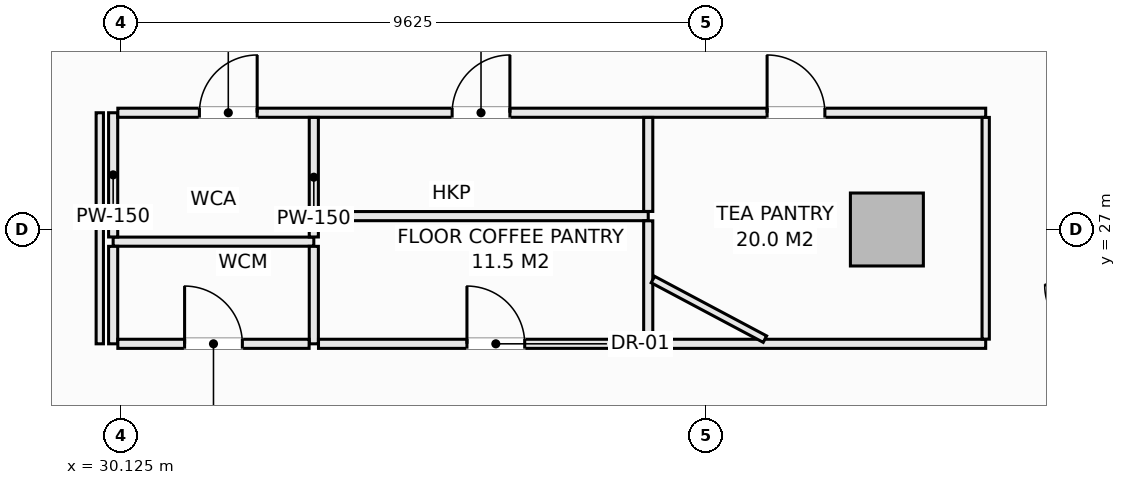
"""IFC4 building model, lengths in metres.
Left out: names, types, materials, properties, quantities, classifications, styles, units other than length and angle.
Written with IfcOpenShell. Run it as: python <this file> out.ifc"""

import sys

from ifc_helpers import new_model, si_unit, direction, frame, frame_2d, origin, origin_2d, place, context, subcontext, project, spatial, rectangle, extrude, element, fill, save


model = new_model("IFC4")
c1 = context("Model", 3, precision=1e-05, world=origin(), true_north=direction((0.0, 1.0)))
c2 = subcontext(c1, "Body", "Model", "MODEL_VIEW")
j1 = project(units=[si_unit("LENGTHUNIT", "METRE"), si_unit("PLANEANGLEUNIT", "RADIAN")], contexts=[c1])
p1 = place(None, origin())
s1 = spatial("IfcSite", under=j1, at=p1, CompositionType="ELEMENT")
p2 = place(p1, origin())
s2 = spatial("IfcBuilding", under=s1, at=p2, CompositionType="ELEMENT")
p3 = place(p2, frame((0.0, 0.0, 68.85)))
s3 = spatial("IfcBuildingStorey", under=s2, at=p3, CompositionType="ELEMENT", Elevation=68.85)
p4 = place(p3, frame((42.725, 27.0, -0.28), z_axis=(0.0, 0.0, 1.0), x_axis=(1.0, 0.0, 0.0)))
e1 = element("IfcColumn", 1, at=p4, inside=s3, PredefinedType="COLUMN", context=c2, shape_type="SweptSolid", body=[
    extrude(rectangle(XDim=1.2, YDim=1.2, at=origin_2d()), origin(), (0.0, 0.0, 1.0), 3.85),
])
p5 = place(p3, frame((30.0, 26.8, 0.0), z_axis=(0.0, 0.0, 1.0), x_axis=(1.0, 0.0, 0.0)))
e2 = element("IfcWall", 2, at=p5, inside=s3, PredefinedType="PARTITIONING", context=c2, shape_type="SweptSolid", body=[
    extrude(rectangle(XDim=3.3, YDim=0.15, at=frame_2d((1.65, 0.0))), origin(), (0.0, 0.0, 1.0), 3.57),
])
p6 = place(p3, frame((30.0, 25.12, 0.0), z_axis=(0.0, 0.0, 1.0), x_axis=(0.0, 1.0, 0.0)))
e3 = element("IfcWall", 3, at=p6, inside=s3, PredefinedType="PARTITIONING", context=c2, shape_type="SweptSolid", body=[
    extrude(rectangle(XDim=1.603, YDim=0.15, at=frame_2d((0.801, 0.0))), origin(), (0.0, 0.0, 1.0), 3.57),
])
p7 = place(p3, frame((30.0, 26.877, 0.0), z_axis=(0.0, 0.0, 1.0), x_axis=(0.0, 1.0, 0.0)))
e4 = element("IfcWall", 4, at=p7, inside=s3, PredefinedType="PARTITIONING", context=c2, shape_type="SweptSolid", body=[
    extrude(rectangle(XDim=2.043, YDim=0.15, at=frame_2d((1.021, 0.0))), origin(), (0.0, 0.0, 1.0), 3.57),
])
p8 = place(p3, frame((30.077, 28.92, 0.0), z_axis=(0.0, 0.0, 1.0), x_axis=(1.0, 0.0, 0.0)))
e5 = element("IfcWall", 5, at=p8, inside=s3, PredefinedType="PARTITIONING", context=c2, shape_type="SweptSolid", body=[
    extrude(rectangle(XDim=14.273, YDim=0.15, at=frame_2d((7.137, 0.0))), origin(), (0.0, 0.0, 1.0), 3.57),
])
p9 = place(p8, frame((1.342, 0.0, 0.0)))
e6 = element("IfcOpeningElement", 6, at=p9, cuts=e5, PredefinedType="OPENING", context=c2, shape_type="SweptSolid", body=[
    extrude(rectangle(XDim=0.95, YDim=2.1, at=frame_2d((0.475, 1.05))), frame((0.0, 0.085, 0.0), z_axis=(0.0, -1.0, 0.0), x_axis=(1.0, 0.0, 0.0)), (0.0, 0.0, 1.0), 0.17),
])
p10 = place(p8, frame((5.498, 0.0, 0.0)))
e7 = element("IfcOpeningElement", 7, at=p10, cuts=e5, PredefinedType="OPENING", context=c2, shape_type="SweptSolid", body=[
    extrude(rectangle(XDim=0.95, YDim=2.1, at=frame_2d((0.475, 1.05))), frame((0.0, 0.085, 0.0), z_axis=(0.0, -1.0, 0.0), x_axis=(1.0, 0.0, 0.0)), (0.0, 0.0, 1.0), 0.17),
])
p11 = place(p8, frame((10.678, 0.0, 0.0)))
e8 = element("IfcOpeningElement", 8, at=p11, cuts=e5, PredefinedType="OPENING", context=c2, shape_type="SweptSolid", body=[
    extrude(rectangle(XDim=0.95, YDim=2.1, at=frame_2d((0.475, 1.05))), frame((0.0, 0.085, 0.0), z_axis=(0.0, -1.0, 0.0), x_axis=(1.0, 0.0, 0.0)), (0.0, 0.0, 1.0), 0.17),
])
p12 = place(p3, frame((33.3, 25.12, 0.0), z_axis=(0.0, 0.0, 1.0), x_axis=(0.0, 1.0, 0.0)))
e9 = element("IfcWall", 9, at=p12, inside=s3, PredefinedType="PARTITIONING", context=c2, shape_type="SweptSolid", body=[
    extrude(rectangle(XDim=1.603, YDim=0.15, at=frame_2d((0.801, 0.0))), origin(), (0.0, 0.0, 1.0), 3.57),
])
p13 = place(p3, frame((33.3, 26.877, 0.0), z_axis=(0.0, 0.0, 1.0), x_axis=(0.0, 1.0, 0.0)))
e10 = element("IfcWall", 10, at=p13, inside=s3, PredefinedType="PARTITIONING", context=c2, shape_type="SweptSolid", body=[
    extrude(rectangle(XDim=1.966, YDim=0.15, at=frame_2d((0.983, 0.0))), origin(), (0.0, 0.0, 1.0), 3.57),
])
p14 = place(p3, frame((30.077, 25.12, 0.0), z_axis=(0.0, 0.0, 1.0), x_axis=(1.0, 0.0, 0.0)))
e11 = element("IfcWall", 11, at=p14, inside=s3, PredefinedType="PARTITIONING", context=c2, shape_type="SweptSolid", body=[
    extrude(rectangle(XDim=3.146, YDim=0.15, at=frame_2d((1.573, 0.0))), origin(), (0.0, 0.0, 1.0), 3.57),
])
p15 = place(p14, frame((1.098, 0.0, 0.0)))
e12 = element("IfcOpeningElement", 12, at=p15, cuts=e11, PredefinedType="OPENING", context=c2, shape_type="SweptSolid", body=[
    extrude(rectangle(XDim=0.95, YDim=2.1, at=frame_2d((0.475, 1.05))), frame((0.0, 0.085, 0.0), z_axis=(0.0, -1.0, 0.0), x_axis=(1.0, 0.0, 0.0)), (0.0, 0.0, 1.0), 0.17),
])
p16 = place(p3, frame((33.377, 25.12, 0.0), z_axis=(0.0, 0.0, 1.0), x_axis=(1.0, 0.0, 0.0)))
e13 = element("IfcWall", 13, at=p16, inside=s3, PredefinedType="PARTITIONING", context=c2, shape_type="SweptSolid", body=[
    extrude(rectangle(XDim=10.973, YDim=0.15, at=frame_2d((5.487, 0.0))), origin(), (0.0, 0.0, 1.0), 3.57),
])
p17 = place(p16, frame((2.441, 0.0, 0.0)))
e14 = element("IfcOpeningElement", 14, at=p17, cuts=e13, PredefinedType="OPENING", context=c2, shape_type="SweptSolid", body=[
    extrude(rectangle(XDim=0.95, YDim=2.1, at=frame_2d((0.475, 1.05))), frame((0.0, 0.085, 0.0), z_axis=(0.0, -1.0, 0.0), x_axis=(1.0, 0.0, 0.0)), (0.0, 0.0, 1.0), 0.17),
])
p18 = place(p3, frame((33.377, 27.22, 0.0), z_axis=(0.0, 0.0, 1.0), x_axis=(1.0, 0.0, 0.0)))
e15 = element("IfcWall", 15, at=p18, inside=s3, PredefinedType="PARTITIONING", context=c2, shape_type="SweptSolid", body=[
    extrude(rectangle(XDim=5.423, YDim=0.15, at=frame_2d((2.711, 0.0))), origin(), (0.0, 0.0, 1.0), 3.57),
])
p19 = place(p3, frame((38.8, 25.197, 0.0), z_axis=(0.0, 0.0, 1.0), x_axis=(0.0, 1.0, 0.0)))
e16 = element("IfcWall", 16, at=p19, inside=s3, PredefinedType="PARTITIONING", context=c2, shape_type="SweptSolid", body=[
    extrude(rectangle(XDim=1.946, YDim=0.15, at=frame_2d((0.973, 0.0))), origin(), (0.0, 0.0, 1.0), 3.57),
])
p20 = place(p3, frame((38.8, 27.297, 0.0), z_axis=(0.0, 0.0, 1.0), x_axis=(0.0, 1.0, 0.0)))
e17 = element("IfcWall", 17, at=p20, inside=s3, PredefinedType="PARTITIONING", context=c2, shape_type="SweptSolid", body=[
    extrude(rectangle(XDim=1.546, YDim=0.15, at=frame_2d((0.773, 0.0))), origin(), (0.0, 0.0, 1.0), 3.57),
])
p21 = place(p3, frame((29.78, 25.12, 0.0), z_axis=(0.0, 0.0, 1.0), x_axis=(0.0, 1.0, 0.0)))
e18 = element("IfcWall", 18, at=p21, inside=s3, PredefinedType="PARTITIONING", context=c2, shape_type="SweptSolid", body=[
    extrude(rectangle(XDim=3.8, YDim=0.12, at=frame_2d((1.9, 0.0))), origin(), (0.0, 0.0, 1.0), 3.57),
])
p22 = place(p3, frame((44.35, 25.197, 0.0), z_axis=(0.0, 0.0, 1.0), x_axis=(0.0, 1.0, 0.0)))
e19 = element("IfcWall", 19, at=p22, inside=s3, PredefinedType="PARTITIONING", context=c2, shape_type="SweptSolid", body=[
    extrude(rectangle(XDim=3.646, YDim=0.12, at=frame_2d((1.823, 0.0))), origin(), (0.0, 0.0, 1.0), 3.57),
])
p23 = place(p3, frame((38.877, 26.177, 0.0), z_axis=(0.0, 0.0, 1.0), x_axis=(0.882864132349, -0.469628495527, 0.0)))
e20 = element("IfcWall", 20, at=p23, inside=s3, PredefinedType="PARTITIONING", context=c2, shape_type="SweptSolid", body=[
    extrude(rectangle(XDim=2.087, YDim=0.12, at=frame_2d((1.043, 0.0))), origin(), (0.0, 0.0, 1.0), 3.57),
])
p24 = place(p9, origin())
e21 = element("IfcDoor", 21, at=p24, inside=s3, OperationType="SINGLE_SWING_RIGHT", PredefinedType="DOOR", context=c2, shape_type="SweptSolid", body=[
    extrude(rectangle(XDim=0.95, YDim=2.1, at=frame_2d((0.475, 1.05))), frame((0.0, 0.025, 0.0), z_axis=(0.0, -1.0, 0.0), x_axis=(1.0, 0.0, 0.0)), (0.0, 0.0, 1.0), 0.05),
])
fill(e6, e21)
p25 = place(p15, origin())
e22 = element("IfcDoor", 22, at=p25, inside=s3, OperationType="SINGLE_SWING_LEFT", PredefinedType="DOOR", context=c2, shape_type="SweptSolid", body=[
    extrude(rectangle(XDim=0.95, YDim=2.1, at=frame_2d((0.475, 1.05))), frame((0.0, 0.025, 0.0), z_axis=(0.0, -1.0, 0.0), x_axis=(1.0, 0.0, 0.0)), (0.0, 0.0, 1.0), 0.05),
])
fill(e12, e22)
p26 = place(p10, origin())
e23 = element("IfcDoor", 23, at=p26, inside=s3, OperationType="SINGLE_SWING_RIGHT", PredefinedType="DOOR", context=c2, shape_type="SweptSolid", body=[
    extrude(rectangle(XDim=0.95, YDim=2.1, at=frame_2d((0.475, 1.05))), frame((0.0, 0.025, 0.0), z_axis=(0.0, -1.0, 0.0), x_axis=(1.0, 0.0, 0.0)), (0.0, 0.0, 1.0), 0.05),
])
fill(e7, e23)
p27 = place(p17, origin())
e24 = element("IfcDoor", 24, at=p27, inside=s3, OperationType="SINGLE_SWING_LEFT", PredefinedType="DOOR", context=c2, shape_type="SweptSolid", body=[
    extrude(rectangle(XDim=0.95, YDim=2.1, at=frame_2d((0.475, 1.05))), frame((0.0, 0.025, 0.0), z_axis=(0.0, -1.0, 0.0), x_axis=(1.0, 0.0, 0.0)), (0.0, 0.0, 1.0), 0.05),
])
fill(e14, e24)
p28 = place(p11, origin())
e25 = element("IfcDoor", 25, at=p28, inside=s3, OperationType="SINGLE_SWING_LEFT", PredefinedType="DOOR", context=c2, shape_type="SweptSolid", body=[
    extrude(rectangle(XDim=0.95, YDim=2.1, at=frame_2d((0.475, 1.05))), frame((0.0, 0.025, 0.0), z_axis=(0.0, -1.0, 0.0), x_axis=(1.0, 0.0, 0.0)), (0.0, 0.0, 1.0), 0.05),
])
fill(e8, e25)
save(model, sys.argv[1])
